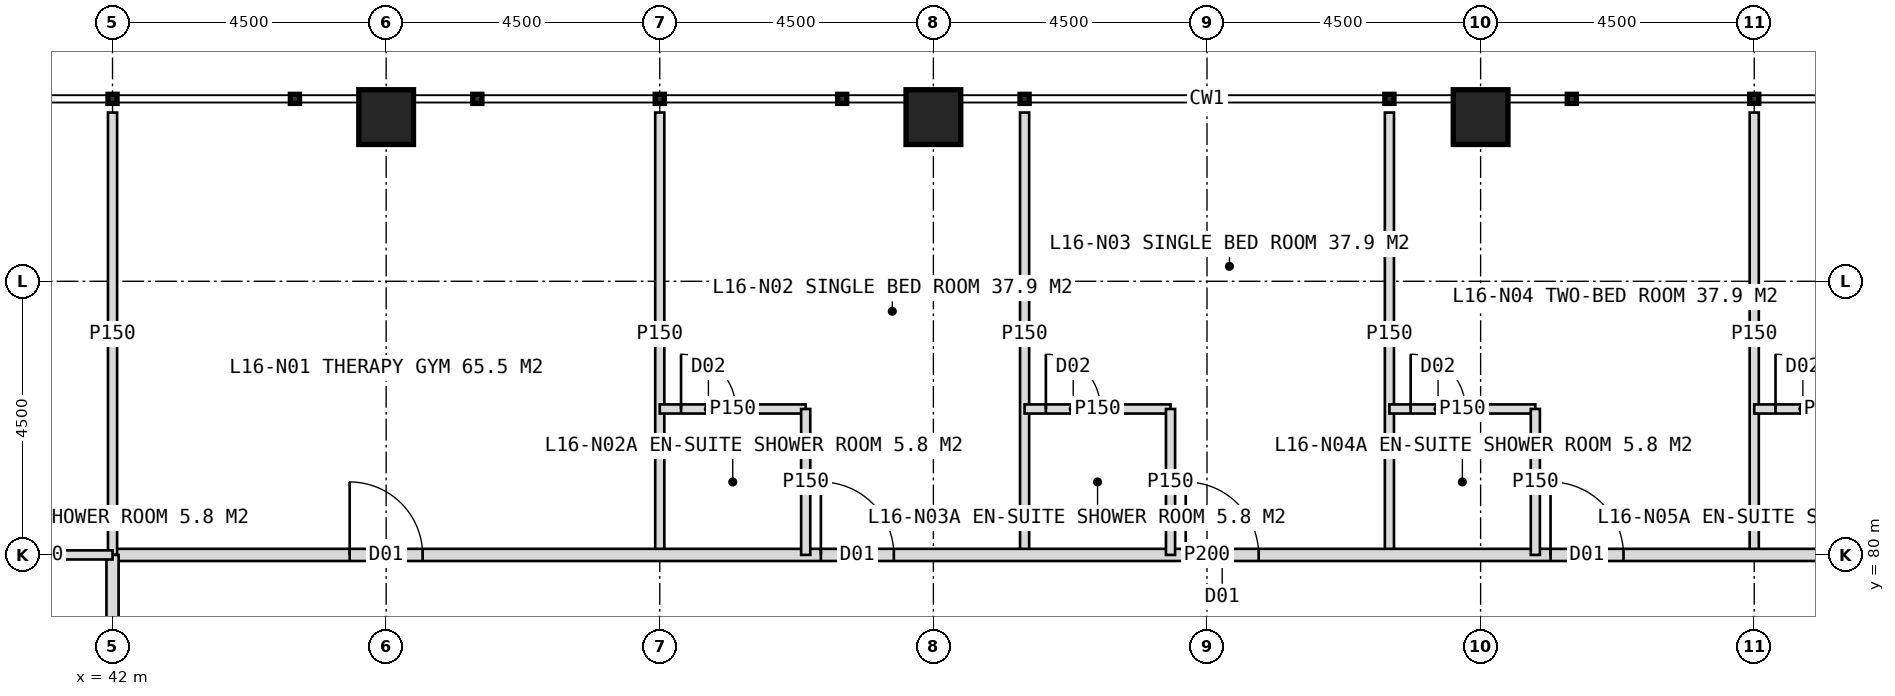
"""IFC4 building model, lengths in metres.
Left out: names, types, materials, properties, quantities, classifications, styles, units other than length and angle.
Written with IfcOpenShell. Run it as: python <this file> out.ifc"""

import sys

from ifc_helpers import new_model, si_unit, direction, frame, frame_2d, origin, origin_2d, place, context, subcontext, project, spatial, rectangle, hollow_rectangle, extrude, element, fill, save


model = new_model("IFC4")
c1 = context("Model", 3, precision=1e-05, world=origin(), true_north=direction((0.0, 1.0)))
c2 = subcontext(c1, "Body", "Model", "MODEL_VIEW")
j1 = project(units=[si_unit("LENGTHUNIT", "METRE"), si_unit("PLANEANGLEUNIT", "RADIAN")], contexts=[c1])
p1 = place(None, origin())
s1 = spatial("IfcSite", under=j1, at=p1, CompositionType="ELEMENT")
p2 = place(p1, origin())
s2 = spatial("IfcBuilding", under=s1, at=p2, CompositionType="ELEMENT")
p3 = place(p2, frame((0.0, 0.0, 71.0)))
s3 = spatial("IfcBuildingStorey", under=s2, at=p3, CompositionType="ELEMENT", Elevation=71.0)
for number, where, z_axis, x_axis in (
    (1, (46.5, 87.2, 0.0), (0.0, 0.0, 1.0), (1.0, 0.0, 0.0)),
    (2, (55.5, 87.2, 0.0), (0.0, 0.0, 1.0), (1.0, 0.0, 0.0)),
    (3, (64.5, 87.2, 0.0), (0.0, 0.0, 1.0), (1.0, 0.0, 0.0)),
):
    element("IfcColumn", number, at=place(p3, frame(where, z_axis=z_axis, x_axis=x_axis)), inside=s3, PredefinedType="COLUMN", context=c2, shape_type="SweptSolid", body=[
        extrude(hollow_rectangle(XDim=0.9, YDim=0.9, WallThickness=0.08, at=origin_2d()), origin(), (0.0, 0.0, 1.0), 4.0),
    ])
for number, where, z_axis, x_axis in (
    (4, (51.0, 80.0, 0.0), (0.0, 0.0, 1.0), (0.0, 1.0, 0.0)),
    (5, (57.0, 80.0, 0.0), (0.0, 0.0, 1.0), (0.0, 1.0, 0.0)),
    (6, (63.0, 80.0, 0.0), (0.0, 0.0, 1.0), (0.0, 1.0, 0.0)),
    (7, (69.0, 80.0, 0.0), (0.0, 0.0, 1.0), (0.0, 1.0, 0.0)),
):
    element("IfcWall", number, at=place(p3, frame(where, z_axis=z_axis, x_axis=x_axis)), inside=s3, PredefinedType="PARTITIONING", context=c2, shape_type="SweptSolid", body=[
        extrude(rectangle(XDim=7.275, YDim=0.15, at=frame_2d((3.637, 0.0))), origin(), (0.0, 0.0, 1.0), 3.75),
    ])
p4 = place(p3, frame((42.0, 80.0, 0.0), z_axis=(0.0, 0.0, 1.0), x_axis=(1.0, 0.0, 0.0)))
e8 = element("IfcWall", 8, at=p4, inside=s3, PredefinedType="PARTITIONING", context=c2, shape_type="SweptSolid", body=[
    extrude(rectangle(XDim=36.0, YDim=0.2, at=frame_2d((18.0, 0.0))), origin(), (0.0, 0.0, 1.0), 3.75),
])
p5 = place(p4, frame((3.9, 0.0, 0.0)))
e9 = element("IfcOpeningElement", 9, at=p5, cuts=e8, PredefinedType="OPENING", context=c2, shape_type="SweptSolid", body=[
    extrude(rectangle(XDim=1.2, YDim=2.2, at=frame_2d((0.6, 1.1))), frame((0.0, 0.11, 0.0), z_axis=(0.0, -1.0, 0.0), x_axis=(1.0, 0.0, 0.0)), (0.0, 0.0, 1.0), 0.22),
])
p6 = place(p4, frame((11.65, 0.0, 0.0)))
e10 = element("IfcOpeningElement", 10, at=p6, cuts=e8, PredefinedType="OPENING", context=c2, shape_type="SweptSolid", body=[
    extrude(rectangle(XDim=1.2, YDim=2.2, at=frame_2d((0.6, 1.1))), frame((0.0, 0.11, 0.0), z_axis=(0.0, -1.0, 0.0), x_axis=(1.0, 0.0, 0.0)), (0.0, 0.0, 1.0), 0.22),
])
p7 = place(p4, frame((17.65, 0.0, 0.0)))
e11 = element("IfcOpeningElement", 11, at=p7, cuts=e8, PredefinedType="OPENING", context=c2, shape_type="SweptSolid", body=[
    extrude(rectangle(XDim=1.2, YDim=2.2, at=frame_2d((0.6, 1.1))), frame((0.0, 0.11, 0.0), z_axis=(0.0, -1.0, 0.0), x_axis=(1.0, 0.0, 0.0)), (0.0, 0.0, 1.0), 0.22),
])
p8 = place(p4, frame((23.65, 0.0, 0.0)))
e12 = element("IfcOpeningElement", 12, at=p8, cuts=e8, PredefinedType="OPENING", context=c2, shape_type="SweptSolid", body=[
    extrude(rectangle(XDim=1.2, YDim=2.2, at=frame_2d((0.6, 1.1))), frame((0.0, 0.11, 0.0), z_axis=(0.0, -1.0, 0.0), x_axis=(1.0, 0.0, 0.0)), (0.0, 0.0, 1.0), 0.22),
])
p9 = place(p4, frame((29.65, 0.0, 0.0)))
e13 = element("IfcOpeningElement", 13, at=p9, cuts=e8, PredefinedType="OPENING", context=c2, shape_type="SweptSolid", body=[
    extrude(rectangle(XDim=1.2, YDim=2.2, at=frame_2d((0.6, 1.1))), frame((0.0, 0.11, 0.0), z_axis=(0.0, -1.0, 0.0), x_axis=(1.0, 0.0, 0.0)), (0.0, 0.0, 1.0), 0.22),
])
p10 = place(p3, frame((42.0, 80.0, 0.0), z_axis=(0.0, 0.0, 1.0), x_axis=(0.0, 1.0, 0.0)))
e14 = element("IfcWall", 14, at=p10, inside=s3, PredefinedType="PARTITIONING", context=c2, shape_type="SweptSolid", body=[
    extrude(rectangle(XDim=7.275, YDim=0.15, at=frame_2d((3.637, 0.0))), origin(), (0.0, 0.0, 1.0), 3.75),
])
p11 = place(p3, frame((51.0, 82.4, 0.0), z_axis=(0.0, 0.0, 1.0), x_axis=(1.0, 0.0, 0.0)))
e15 = element("IfcWall", 15, at=p11, inside=s3, PredefinedType="PARTITIONING", context=c2, shape_type="SweptSolid", body=[
    extrude(rectangle(XDim=2.4, YDim=0.15, at=frame_2d((1.2, 0.0))), origin(), (0.0, 0.0, 1.0), 3.75),
])
p12 = place(p11, frame((0.35, 0.0, 0.0)))
e16 = element("IfcOpeningElement", 16, at=p12, cuts=e15, PredefinedType="OPENING", context=c2, shape_type="SweptSolid", body=[
    extrude(rectangle(XDim=0.9, YDim=2.1, at=frame_2d((0.45, 1.05))), frame((0.0, 0.085, 0.0), z_axis=(0.0, -1.0, 0.0), x_axis=(1.0, 0.0, 0.0)), (0.0, 0.0, 1.0), 0.17),
])
p13 = place(p3, frame((53.4, 80.0, 0.0), z_axis=(0.0, 0.0, 1.0), x_axis=(0.0, 1.0, 0.0)))
e17 = element("IfcWall", 17, at=p13, inside=s3, PredefinedType="PARTITIONING", context=c2, shape_type="SweptSolid", body=[
    extrude(rectangle(XDim=2.4, YDim=0.15, at=frame_2d((1.2, 0.0))), origin(), (0.0, 0.0, 1.0), 3.75),
])
p14 = place(p3, frame((57.0, 82.4, 0.0), z_axis=(0.0, 0.0, 1.0), x_axis=(1.0, 0.0, 0.0)))
e18 = element("IfcWall", 18, at=p14, inside=s3, PredefinedType="PARTITIONING", context=c2, shape_type="SweptSolid", body=[
    extrude(rectangle(XDim=2.4, YDim=0.15, at=frame_2d((1.2, 0.0))), origin(), (0.0, 0.0, 1.0), 3.75),
])
p15 = place(p14, frame((0.35, 0.0, 0.0)))
e19 = element("IfcOpeningElement", 19, at=p15, cuts=e18, PredefinedType="OPENING", context=c2, shape_type="SweptSolid", body=[
    extrude(rectangle(XDim=0.9, YDim=2.1, at=frame_2d((0.45, 1.05))), frame((0.0, 0.085, 0.0), z_axis=(0.0, -1.0, 0.0), x_axis=(1.0, 0.0, 0.0)), (0.0, 0.0, 1.0), 0.17),
])
p16 = place(p3, frame((59.4, 80.0, 0.0), z_axis=(0.0, 0.0, 1.0), x_axis=(0.0, 1.0, 0.0)))
e20 = element("IfcWall", 20, at=p16, inside=s3, PredefinedType="PARTITIONING", context=c2, shape_type="SweptSolid", body=[
    extrude(rectangle(XDim=2.4, YDim=0.15, at=frame_2d((1.2, 0.0))), origin(), (0.0, 0.0, 1.0), 3.75),
])
p17 = place(p3, frame((63.0, 82.4, 0.0), z_axis=(0.0, 0.0, 1.0), x_axis=(1.0, 0.0, 0.0)))
e21 = element("IfcWall", 21, at=p17, inside=s3, PredefinedType="PARTITIONING", context=c2, shape_type="SweptSolid", body=[
    extrude(rectangle(XDim=2.4, YDim=0.15, at=frame_2d((1.2, 0.0))), origin(), (0.0, 0.0, 1.0), 3.75),
])
p18 = place(p17, frame((0.35, 0.0, 0.0)))
e22 = element("IfcOpeningElement", 22, at=p18, cuts=e21, PredefinedType="OPENING", context=c2, shape_type="SweptSolid", body=[
    extrude(rectangle(XDim=0.9, YDim=2.1, at=frame_2d((0.45, 1.05))), frame((0.0, 0.085, 0.0), z_axis=(0.0, -1.0, 0.0), x_axis=(1.0, 0.0, 0.0)), (0.0, 0.0, 1.0), 0.17),
])
p19 = place(p3, frame((65.4, 80.0, 0.0), z_axis=(0.0, 0.0, 1.0), x_axis=(0.0, 1.0, 0.0)))
e23 = element("IfcWall", 23, at=p19, inside=s3, PredefinedType="PARTITIONING", context=c2, shape_type="SweptSolid", body=[
    extrude(rectangle(XDim=2.4, YDim=0.15, at=frame_2d((1.2, 0.0))), origin(), (0.0, 0.0, 1.0), 3.75),
])
p20 = place(p3, frame((69.0, 82.4, 0.0), z_axis=(0.0, 0.0, 1.0), x_axis=(1.0, 0.0, 0.0)))
e24 = element("IfcWall", 24, at=p20, inside=s3, PredefinedType="PARTITIONING", context=c2, shape_type="SweptSolid", body=[
    extrude(rectangle(XDim=2.4, YDim=0.15, at=frame_2d((1.2, 0.0))), origin(), (0.0, 0.0, 1.0), 3.75),
])
p21 = place(p20, frame((0.35, 0.0, 0.0)))
e25 = element("IfcOpeningElement", 25, at=p21, cuts=e24, PredefinedType="OPENING", context=c2, shape_type="SweptSolid", body=[
    extrude(rectangle(XDim=0.9, YDim=2.1, at=frame_2d((0.45, 1.05))), frame((0.0, 0.085, 0.0), z_axis=(0.0, -1.0, 0.0), x_axis=(1.0, 0.0, 0.0)), (0.0, 0.0, 1.0), 0.17),
])
p22 = place(p3, frame((42.0, 44.0, 0.0), z_axis=(0.0, 0.0, 1.0), x_axis=(0.0, 1.0, 0.0)))
e26 = element("IfcWall", 26, at=p22, inside=s3, PredefinedType="PARTITIONING", context=c2, shape_type="SweptSolid", body=[
    extrude(rectangle(XDim=36.0, YDim=0.2, at=frame_2d((18.0, 0.0))), origin(), (0.0, 0.0, 1.0), 3.75),
])
p23 = place(p22, frame((2.65, 0.0, 0.0)))
e27 = element("IfcOpeningElement", 27, at=p23, cuts=e26, PredefinedType="OPENING", context=c2, shape_type="SweptSolid", body=[
    extrude(rectangle(XDim=1.2, YDim=2.2, at=frame_2d((0.6, 1.1))), frame((0.0, 0.11, 0.0), z_axis=(0.0, -1.0, 0.0), x_axis=(1.0, 0.0, 0.0)), (0.0, 0.0, 1.0), 0.22),
])
p24 = place(p22, frame((8.65, 0.0, 0.0)))
e28 = element("IfcOpeningElement", 28, at=p24, cuts=e26, PredefinedType="OPENING", context=c2, shape_type="SweptSolid", body=[
    extrude(rectangle(XDim=1.2, YDim=2.2, at=frame_2d((0.6, 1.1))), frame((0.0, 0.11, 0.0), z_axis=(0.0, -1.0, 0.0), x_axis=(1.0, 0.0, 0.0)), (0.0, 0.0, 1.0), 0.22),
])
p25 = place(p22, frame((14.65, 0.0, 0.0)))
e29 = element("IfcOpeningElement", 29, at=p25, cuts=e26, PredefinedType="OPENING", context=c2, shape_type="SweptSolid", body=[
    extrude(rectangle(XDim=1.2, YDim=2.2, at=frame_2d((0.6, 1.1))), frame((0.0, 0.11, 0.0), z_axis=(0.0, -1.0, 0.0), x_axis=(1.0, 0.0, 0.0)), (0.0, 0.0, 1.0), 0.22),
])
p26 = place(p22, frame((20.65, 0.0, 0.0)))
e30 = element("IfcOpeningElement", 30, at=p26, cuts=e26, PredefinedType="OPENING", context=c2, shape_type="SweptSolid", body=[
    extrude(rectangle(XDim=1.2, YDim=2.2, at=frame_2d((0.6, 1.1))), frame((0.0, 0.11, 0.0), z_axis=(0.0, -1.0, 0.0), x_axis=(1.0, 0.0, 0.0)), (0.0, 0.0, 1.0), 0.22),
])
p27 = place(p22, frame((26.65, 0.0, 0.0)))
e31 = element("IfcOpeningElement", 31, at=p27, cuts=e26, PredefinedType="OPENING", context=c2, shape_type="SweptSolid", body=[
    extrude(rectangle(XDim=1.2, YDim=2.2, at=frame_2d((0.6, 1.1))), frame((0.0, 0.11, 0.0), z_axis=(0.0, -1.0, 0.0), x_axis=(1.0, 0.0, 0.0)), (0.0, 0.0, 1.0), 0.22),
])
p28 = place(p22, frame((31.15, 0.0, 0.0)))
e32 = element("IfcOpeningElement", 32, at=p28, cuts=e26, PredefinedType="OPENING", context=c2, shape_type="SweptSolid", body=[
    extrude(rectangle(XDim=1.2, YDim=2.2, at=frame_2d((0.6, 1.1))), frame((0.0, 0.11, 0.0), z_axis=(0.0, -1.0, 0.0), x_axis=(1.0, 0.0, 0.0)), (0.0, 0.0, 1.0), 0.22),
])
p29 = place(p3, frame((42.0, 80.0, 0.0), z_axis=(0.0, 0.0, 1.0), x_axis=(-1.0, 0.0, 0.0)))
e33 = element("IfcWall", 33, at=p29, inside=s3, PredefinedType="PARTITIONING", context=c2, shape_type="SweptSolid", body=[
    extrude(rectangle(XDim=2.4, YDim=0.15, at=frame_2d((1.2, 0.0))), origin(), (0.0, 0.0, 1.0), 3.75),
])
p30 = place(p5, origin())
e34 = element("IfcDoor", 34, at=p30, inside=s3, OperationType="SINGLE_SWING_LEFT", PredefinedType="DOOR", context=c2, shape_type="SweptSolid", body=[
    extrude(rectangle(XDim=1.2, YDim=2.2, at=frame_2d((0.6, 1.1))), frame((0.0, 0.025, 0.0), z_axis=(0.0, -1.0, 0.0), x_axis=(1.0, 0.0, 0.0)), (0.0, 0.0, 1.0), 0.05),
])
fill(e9, e34)
p31 = place(p6, origin())
e35 = element("IfcDoor", 35, at=p31, inside=s3, OperationType="SINGLE_SWING_LEFT", PredefinedType="DOOR", context=c2, shape_type="SweptSolid", body=[
    extrude(rectangle(XDim=1.2, YDim=2.2, at=frame_2d((0.6, 1.1))), frame((0.0, 0.025, 0.0), z_axis=(0.0, -1.0, 0.0), x_axis=(1.0, 0.0, 0.0)), (0.0, 0.0, 1.0), 0.05),
])
fill(e10, e35)
p32 = place(p12, origin())
e36 = element("IfcDoor", 36, at=p32, inside=s3, OperationType="SINGLE_SWING_LEFT", PredefinedType="DOOR", context=c2, shape_type="SweptSolid", body=[
    extrude(rectangle(XDim=0.9, YDim=2.1, at=frame_2d((0.45, 1.05))), frame((0.0, 0.025, 0.0), z_axis=(0.0, -1.0, 0.0), x_axis=(1.0, 0.0, 0.0)), (0.0, 0.0, 1.0), 0.05),
])
fill(e16, e36)
p33 = place(p7, origin())
e37 = element("IfcDoor", 37, at=p33, inside=s3, OperationType="SINGLE_SWING_LEFT", PredefinedType="DOOR", context=c2, shape_type="SweptSolid", body=[
    extrude(rectangle(XDim=1.2, YDim=2.2, at=frame_2d((0.6, 1.1))), frame((0.0, 0.025, 0.0), z_axis=(0.0, -1.0, 0.0), x_axis=(1.0, 0.0, 0.0)), (0.0, 0.0, 1.0), 0.05),
])
fill(e11, e37)
p34 = place(p15, origin())
e38 = element("IfcDoor", 38, at=p34, inside=s3, OperationType="SINGLE_SWING_LEFT", PredefinedType="DOOR", context=c2, shape_type="SweptSolid", body=[
    extrude(rectangle(XDim=0.9, YDim=2.1, at=frame_2d((0.45, 1.05))), frame((0.0, 0.025, 0.0), z_axis=(0.0, -1.0, 0.0), x_axis=(1.0, 0.0, 0.0)), (0.0, 0.0, 1.0), 0.05),
])
fill(e19, e38)
p35 = place(p8, origin())
e39 = element("IfcDoor", 39, at=p35, inside=s3, OperationType="SINGLE_SWING_LEFT", PredefinedType="DOOR", context=c2, shape_type="SweptSolid", body=[
    extrude(rectangle(XDim=1.2, YDim=2.2, at=frame_2d((0.6, 1.1))), frame((0.0, 0.025, 0.0), z_axis=(0.0, -1.0, 0.0), x_axis=(1.0, 0.0, 0.0)), (0.0, 0.0, 1.0), 0.05),
])
fill(e12, e39)
p36 = place(p18, origin())
e40 = element("IfcDoor", 40, at=p36, inside=s3, OperationType="SINGLE_SWING_LEFT", PredefinedType="DOOR", context=c2, shape_type="SweptSolid", body=[
    extrude(rectangle(XDim=0.9, YDim=2.1, at=frame_2d((0.45, 1.05))), frame((0.0, 0.025, 0.0), z_axis=(0.0, -1.0, 0.0), x_axis=(1.0, 0.0, 0.0)), (0.0, 0.0, 1.0), 0.05),
])
fill(e22, e40)
p37 = place(p21, origin())
e41 = element("IfcDoor", 41, at=p37, inside=s3, OperationType="SINGLE_SWING_LEFT", PredefinedType="DOOR", context=c2, shape_type="SweptSolid", body=[
    extrude(rectangle(XDim=0.9, YDim=2.1, at=frame_2d((0.45, 1.05))), frame((0.0, 0.025, 0.0), z_axis=(0.0, -1.0, 0.0), x_axis=(1.0, 0.0, 0.0)), (0.0, 0.0, 1.0), 0.05),
])
fill(e25, e41)
save(model, sys.argv[1])
